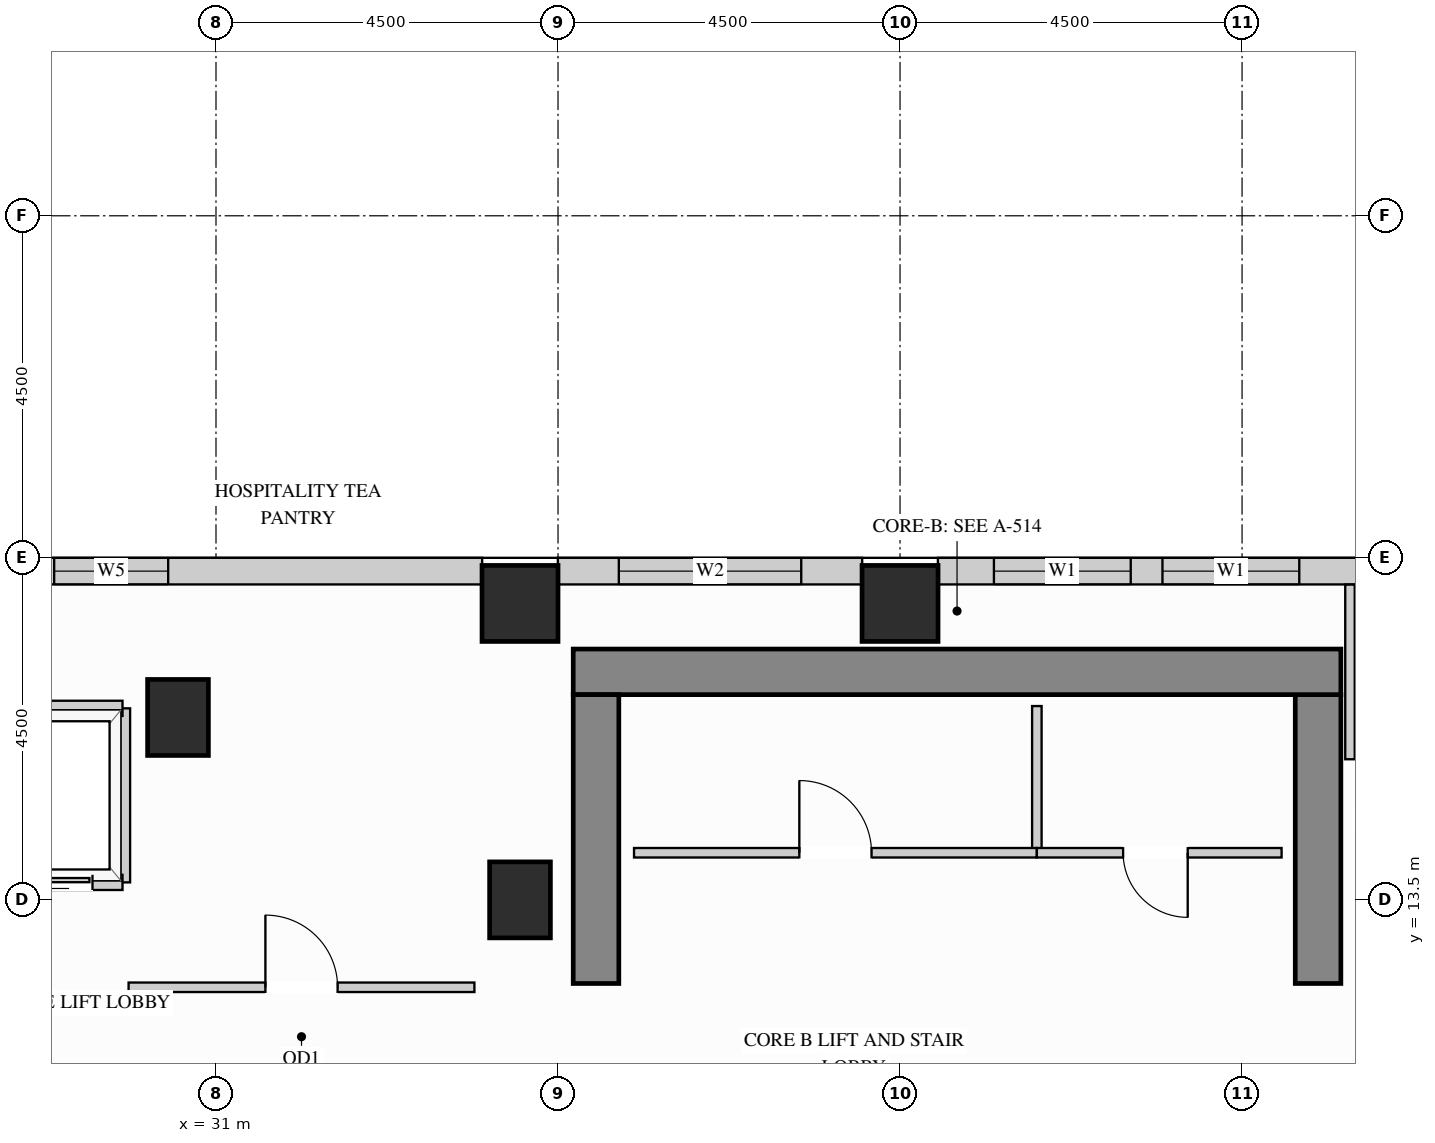
"""IFC4 building model, lengths in metres.
Left out: names, types, materials, properties, quantities, classifications, styles, units other than length and angle.
Written with IfcOpenShell. Run it as: python <this file> out.ifc"""

import sys

from ifc_helpers import new_model, si_unit, direction, frame, frame_2d, origin, origin_2d, place, context, subcontext, project, spatial, rectangle, extrude, source, transform, mapped, element, fill, save


model = new_model("IFC4")
c1 = context("Model", 3, precision=1e-05, world=origin(), true_north=direction((0.0, 1.0)))
c2 = subcontext(c1, "Body", "Model", "MODEL_VIEW")
j1 = project(units=[si_unit("LENGTHUNIT", "METRE"), si_unit("PLANEANGLEUNIT", "RADIAN")], contexts=[c1])
p1 = place(None, origin())
s1 = spatial("IfcSite", under=j1, at=p1, CompositionType="ELEMENT")
p2 = place(p1, origin())
s2 = spatial("IfcBuilding", under=s1, at=p2, CompositionType="ELEMENT")
p3 = place(p2, frame((0.0, 0.0, 164.7)))
s3 = spatial("IfcBuildingStorey", under=s2, at=p3, CompositionType="ELEMENT", Elevation=164.7)
m1 = source(origin(), c2, "Body", "SweptSolid", [
    extrude(rectangle(XDim=0.8, YDim=1.0, at=origin_2d()), origin(), (0.0, 0.0, 1.0), 3.4),
])
for number, where, z_axis, x_axis in (
    (1, (35.0, 13.5, 0.0), (0.0, 0.0, 1.0), (1.0, 0.0, 0.0)),
    (2, (30.5, 15.9, 0.0), (0.0, 0.0, 1.0), (1.0, 0.0, 0.0)),
):
    element("IfcColumn", number, at=place(p3, frame(where, z_axis=z_axis, x_axis=x_axis)), inside=s3, PredefinedType="COLUMN", context=c2, shape_type="MappedRepresentation", body=[
        mapped(m1, transform((0.0, 0.0, 0.0), x_axis=(1.0, 0.0, 0.0), y_axis=(0.0, 1.0, 0.0), z_axis=(0.0, 0.0, 1.0))),
    ])
m2 = source(origin(), c2, "Body", "SweptSolid", [
    extrude(rectangle(XDim=1.0, YDim=1.0, at=origin_2d()), origin(), (0.0, 0.0, 1.0), 3.4),
])
for number, where, z_axis, x_axis in (
    (3, (35.0, 17.4, 0.0), (0.0, 0.0, 1.0), (1.0, 0.0, 0.0)),
    (4, (40.0, 17.4, 0.0), (0.0, 0.0, 1.0), (1.0, 0.0, 0.0)),
):
    element("IfcColumn", number, at=place(p3, frame(where, z_axis=z_axis, x_axis=x_axis)), inside=s3, PredefinedType="COLUMN", context=c2, shape_type="MappedRepresentation", body=[
        mapped(m2, transform((0.0, 0.0, 0.0), x_axis=(1.0, 0.0, 0.0), y_axis=(0.0, 1.0, 0.0), z_axis=(0.0, 0.0, 1.0))),
    ])
m3 = source(origin(), c2, "Body", "SweptSolid", [
    extrude(rectangle(XDim=3.8, YDim=0.6, at=frame_2d((1.9, 0.0))), origin(), (0.0, 0.0, 1.0), 3.4),
])
p4 = place(p3, frame((45.5, 12.4, 0.0), z_axis=(0.0, 0.0, 1.0), x_axis=(0.0, 1.0, 0.0)))
e5 = element("IfcWall", 5, at=p4, inside=s3, PredefinedType="SHEAR", context=c2, shape_type="MappedRepresentation", body=[
    mapped(m3, transform((0.0, 0.0, 0.0), x_axis=(1.0, 0.0, 0.0), y_axis=(0.0, 1.0, 0.0), z_axis=(0.0, 0.0, 1.0))),
])
m4 = source(origin(), c2, "Body", "SweptSolid", [
    extrude(rectangle(XDim=10.1, YDim=0.6, at=frame_2d((5.05, 0.0))), origin(), (0.0, 0.0, 1.0), 3.4),
])
p5 = place(p3, frame((35.7, 16.5, 0.0), z_axis=(0.0, 0.0, 1.0), x_axis=(1.0, 0.0, 0.0)))
e6 = element("IfcWall", 6, at=p5, inside=s3, PredefinedType="SHEAR", context=c2, shape_type="MappedRepresentation", body=[
    mapped(m4, transform((0.0, 0.0, 0.0), x_axis=(1.0, 0.0, 0.0), y_axis=(0.0, 1.0, 0.0), z_axis=(0.0, 0.0, 1.0))),
])
p6 = place(p3, frame((36.0, 12.4, 0.0), z_axis=(0.0, 0.0, 1.0), x_axis=(0.0, 1.0, 0.0)))
e7 = element("IfcWall", 7, at=p6, inside=s3, PredefinedType="SHEAR", context=c2, shape_type="MappedRepresentation", body=[
    mapped(m3, transform((0.0, 0.0, 0.0), x_axis=(1.0, 0.0, 0.0), y_axis=(0.0, 1.0, 0.0), z_axis=(0.0, 0.0, 1.0))),
])
p7 = place(p3, frame((47.102, 17.825, 0.0), z_axis=(0.0, 0.0, 1.0), x_axis=(-1.0, 0.0, 0.0)))
e8 = element("IfcWall", 8, at=p7, inside=s3, PredefinedType="SOLIDWALL", context=c2, shape_type="SweptSolid", body=[
    extrude(rectangle(XDim=6.604, YDim=0.35, at=frame_2d((3.302, 0.0))), origin(), (0.0, 0.0, 1.0), 2.612),
])
p8 = place(p7, frame((1.849, 0.0, 0.78)))
e9 = element("IfcOpeningElement", 9, at=p8, cuts=e8, PredefinedType="OPENING", context=c2, shape_type="SweptSolid", body=[
    extrude(rectangle(XDim=1.8, YDim=1.652, at=frame_2d((0.9, 0.826))), frame((0.0, 0.185, 0.0), z_axis=(0.0, -1.0, 0.0), x_axis=(1.0, 0.0, 0.0)), (0.0, 0.0, 1.0), 0.37),
])
p9 = place(p7, frame((4.067, 0.0, 0.78)))
e10 = element("IfcOpeningElement", 10, at=p9, cuts=e8, PredefinedType="OPENING", context=c2, shape_type="SweptSolid", body=[
    extrude(rectangle(XDim=1.8, YDim=1.652, at=frame_2d((0.9, 0.826))), frame((0.0, 0.185, 0.0), z_axis=(0.0, -1.0, 0.0), x_axis=(1.0, 0.0, 0.0)), (0.0, 0.0, 1.0), 0.37),
])
p10 = place(p3, frame((39.502, 17.825, 0.0), z_axis=(0.0, 0.0, 1.0), x_axis=(-1.0, 0.0, 0.0)))
e11 = element("IfcWall", 11, at=p10, inside=s3, PredefinedType="SOLIDWALL", context=c2, shape_type="SweptSolid", body=[
    extrude(rectangle(XDim=4.004, YDim=0.35, at=frame_2d((2.002, 0.0))), origin(), (0.0, 0.0, 1.0), 2.612),
])
p11 = place(p10, frame((0.802, 0.0, 0.78)))
e12 = element("IfcOpeningElement", 12, at=p11, cuts=e11, PredefinedType="OPENING", context=c2, shape_type="SweptSolid", body=[
    extrude(rectangle(XDim=2.4, YDim=1.652, at=frame_2d((1.2, 0.826))), frame((0.0, 0.185, 0.0), z_axis=(0.0, -1.0, 0.0), x_axis=(1.0, 0.0, 0.0)), (0.0, 0.0, 1.0), 0.37),
])
p12 = place(p3, frame((34.502, 17.825, 0.0), z_axis=(0.0, 0.0, 1.0), x_axis=(-1.0, 0.0, 0.0)))
e13 = element("IfcWall", 13, at=p12, inside=s3, PredefinedType="SOLIDWALL", context=c2, shape_type="SweptSolid", body=[
    extrude(rectangle(XDim=15.104, YDim=0.35, at=frame_2d((7.552, 0.0))), origin(), (0.0, 0.0, 1.0), 3.385),
])
p13 = place(p12, frame((4.131, 0.0, 0.78)))
e14 = element("IfcOpeningElement", 14, at=p13, cuts=e13, PredefinedType="OPENING", context=c2, shape_type="SweptSolid", body=[
    extrude(rectangle(XDim=1.5, YDim=2.0, at=frame_2d((0.75, 1.0))), frame((0.0, 0.185, 0.0), z_axis=(0.0, -1.0, 0.0), x_axis=(1.0, 0.0, 0.0)), (0.0, 0.0, 1.0), 0.37),
])
p14 = place(p12, frame((9.442, 0.0, 0.78)))
e15 = element("IfcOpeningElement", 15, at=p14, cuts=e13, PredefinedType="OPENING", context=c2, shape_type="SweptSolid", body=[
    extrude(rectangle(XDim=1.5, YDim=2.0, at=frame_2d((0.75, 1.0))), frame((0.0, 0.185, 0.0), z_axis=(0.0, -1.0, 0.0), x_axis=(1.0, 0.0, 0.0)), (0.0, 0.0, 1.0), 0.37),
])
m5 = source(origin(), c2, "Body", "SweptSolid", [
    extrude(rectangle(XDim=1.93, YDim=0.125, at=frame_2d((0.965, 0.0))), origin(), (0.0, 0.0, 1.0), 3.385),
])
p15 = place(p3, frame((41.8, 14.12, 0.0), z_axis=(0.0, 0.0, 1.0), x_axis=(0.0, 1.0, 0.0)))
e16 = element("IfcWall", 16, at=p15, inside=s3, PredefinedType="PARTITIONING", context=c2, shape_type="MappedRepresentation", body=[
    mapped(m5, transform((0.0, 0.0, 0.0), x_axis=(1.0, 0.0, 0.0), y_axis=(0.0, 1.0, 0.0), z_axis=(0.0, 0.0, 1.0))),
])
p16 = place(p3, frame((36.5, 14.12, 0.0), z_axis=(0.0, 0.0, 1.0), x_axis=(1.0, 0.0, 0.0)))
e17 = element("IfcWall", 17, at=p16, inside=s3, PredefinedType="PARTITIONING", context=c2, shape_type="SweptSolid", body=[
    extrude(rectangle(XDim=5.3, YDim=0.125, at=frame_2d((2.65, 0.0))), origin(), (0.0, 0.0, 1.0), 3.385),
])
p17 = place(p16, frame((2.175, 0.0, 0.0)))
e18 = element("IfcOpeningElement", 18, at=p17, cuts=e17, PredefinedType="OPENING", context=c2, shape_type="SweptSolid", body=[
    extrude(rectangle(XDim=0.95, YDim=2.15, at=frame_2d((0.475, 1.075))), frame((0.0, 0.073, 0.0), z_axis=(0.0, -1.0, 0.0), x_axis=(1.0, 0.0, 0.0)), (0.0, 0.0, 1.0), 0.145),
])
p18 = place(p3, frame((41.8, 14.12, 0.0), z_axis=(0.0, 0.0, 1.0), x_axis=(1.0, 0.0, 0.0)))
e19 = element("IfcWall", 19, at=p18, inside=s3, PredefinedType="PARTITIONING", context=c2, shape_type="SweptSolid", body=[
    extrude(rectangle(XDim=3.22, YDim=0.125, at=frame_2d((1.61, 0.0))), origin(), (0.0, 0.0, 1.0), 3.385),
])
p19 = place(p18, frame((1.135, 0.0, 0.0)))
e20 = element("IfcOpeningElement", 20, at=p19, cuts=e19, PredefinedType="OPENING", context=c2, shape_type="SweptSolid", body=[
    extrude(rectangle(XDim=0.85, YDim=2.1, at=frame_2d((0.425, 1.05))), frame((0.0, 0.073, 0.0), z_axis=(0.0, -1.0, 0.0), x_axis=(1.0, 0.0, 0.0)), (0.0, 0.0, 1.0), 0.145),
])
m6 = source(origin(), c2, "Body", "SweptSolid", [
    extrude(rectangle(XDim=2.298, YDim=0.125, at=frame_2d((1.149, 0.0))), origin(), (0.0, 0.0, 1.0), 3.385),
])
p20 = place(p3, frame((45.92, 15.35, 0.0), z_axis=(0.0, 0.0, 1.0), x_axis=(0.0, 1.0, 0.0)))
e21 = element("IfcWall", 21, at=p20, inside=s3, PredefinedType="PARTITIONING", context=c2, shape_type="MappedRepresentation", body=[
    mapped(m6, transform((0.0, 0.0, 0.0), x_axis=(1.0, 0.0, 0.0), y_axis=(0.0, 1.0, 0.0), z_axis=(0.0, 0.0, 1.0))),
])
p21 = place(p3, frame((29.85, 12.35, 0.0), z_axis=(0.0, 0.0, 1.0), x_axis=(1.0, 0.0, 0.0)))
e22 = element("IfcWall", 22, at=p21, inside=s3, PredefinedType="PARTITIONING", context=c2, shape_type="SweptSolid", body=[
    extrude(rectangle(XDim=4.55, YDim=0.125, at=frame_2d((2.275, 0.0))), origin(), (0.0, 0.0, 1.0), 3.385),
])
p22 = place(p21, frame((1.8, 0.0, 0.0)))
e23 = element("IfcOpeningElement", 23, at=p22, cuts=e22, PredefinedType="OPENING", context=c2, shape_type="SweptSolid", body=[
    extrude(rectangle(XDim=0.95, YDim=2.15, at=frame_2d((0.475, 1.075))), frame((0.0, 0.073, 0.0), z_axis=(0.0, -1.0, 0.0), x_axis=(1.0, 0.0, 0.0)), (0.0, 0.0, 1.0), 0.145),
])
m7 = source(origin(), c2, "Body", "SweptSolid", [
    extrude(rectangle(XDim=2.29, YDim=0.2, at=frame_2d((1.145, 0.0))), origin(), (0.0, 0.0, 1.0), 3.385),
])
p23 = place(p3, frame((29.77, 13.73, 0.0), z_axis=(0.0, 0.0, 1.0), x_axis=(0.0, 1.0, 0.0)))
e24 = element("IfcWall", 24, at=p23, inside=s3, PredefinedType="PARTITIONING", context=c2, shape_type="MappedRepresentation", body=[
    mapped(m7, transform((0.0, 0.0, 0.0), x_axis=(1.0, 0.0, 0.0), y_axis=(0.0, 1.0, 0.0), z_axis=(0.0, 0.0, 1.0))),
])
m8 = source(origin(), c2, "Body", "SweptSolid", [
    extrude(rectangle(XDim=1.89, YDim=0.2, at=frame_2d((0.945, 0.0))), origin(), (0.0, 0.0, 1.0), 2.773),
])
p24 = place(p3, frame((27.88, 16.02, 0.0), z_axis=(0.0, 0.0, 1.0), x_axis=(1.0, 0.0, 0.0)))
e25 = element("IfcWall", 25, at=p24, inside=s3, PredefinedType="PARTITIONING", context=c2, shape_type="MappedRepresentation", body=[
    mapped(m8, transform((0.0, 0.0, 0.0), x_axis=(1.0, 0.0, 0.0), y_axis=(0.0, 1.0, 0.0), z_axis=(0.0, 0.0, 1.0))),
])
p25 = place(p3, frame((27.88, 13.73, 0.0), z_axis=(0.0, 0.0, 1.0), x_axis=(1.0, 0.0, 0.0)))
e26 = element("IfcWall", 26, at=p25, inside=s3, PredefinedType="PARTITIONING", context=c2, shape_type="SweptSolid", body=[
    extrude(rectangle(XDim=1.89, YDim=0.2, at=frame_2d((0.945, 0.0))), origin(), (0.0, 0.0, 1.0), 2.466),
])
p26 = place(p25, frame((0.395, 0.0, 0.0)))
e27 = element("IfcOpeningElement", 27, at=p26, cuts=e26, PredefinedType="OPENING", context=c2, shape_type="SweptSolid", body=[
    extrude(rectangle(XDim=1.1, YDim=2.2, at=frame_2d((0.55, 1.1))), frame((0.0, 0.11, 0.0), z_axis=(0.0, -1.0, 0.0), x_axis=(1.0, 0.0, 0.0)), (0.0, 0.0, 1.0), 0.22),
])
m9 = source(origin(), c2, "Body", "SweptSolid", [
    extrude(rectangle(XDim=1.1, YDim=2.2, at=frame_2d((0.55, 1.1))), frame((0.0, 0.025, 0.0), z_axis=(0.0, -1.0, 0.0), x_axis=(1.0, 0.0, 0.0)), (0.0, 0.0, 1.0), 0.05),
])
p27 = place(p26, origin())
e28 = element("IfcDoor", 28, at=p27, inside=s3, OperationType="SLIDING_TO_LEFT", PredefinedType="DOOR", context=c2, shape_type="MappedRepresentation", body=[
    mapped(m9, transform((0.0, 0.0, 0.0), x_axis=(1.0, 0.0, 0.0), y_axis=(0.0, 1.0, 0.0), z_axis=(0.0, 0.0, 1.0))),
])
fill(e27, e28)
m10 = source(origin(), c2, "Body", "SweptSolid", [
    extrude(rectangle(XDim=0.95, YDim=2.15, at=frame_2d((0.475, 1.075))), frame((0.0, 0.025, 0.0), z_axis=(0.0, -1.0, 0.0), x_axis=(1.0, 0.0, 0.0)), (0.0, 0.0, 1.0), 0.05),
])
p28 = place(p17, origin())
e29 = element("IfcDoor", 29, at=p28, inside=s3, OperationType="SINGLE_SWING_LEFT", PredefinedType="DOOR", context=c2, shape_type="MappedRepresentation", body=[
    mapped(m10, transform((0.0, 0.0, 0.0), x_axis=(1.0, 0.0, 0.0), y_axis=(0.0, 1.0, 0.0), z_axis=(0.0, 0.0, 1.0))),
])
fill(e18, e29)
p29 = place(p22, origin())
e30 = element("IfcDoor", 30, at=p29, inside=s3, OperationType="SINGLE_SWING_LEFT", PredefinedType="DOOR", context=c2, shape_type="MappedRepresentation", body=[
    mapped(m10, transform((0.0, 0.0, 0.0), x_axis=(1.0, 0.0, 0.0), y_axis=(0.0, 1.0, 0.0), z_axis=(0.0, 0.0, 1.0))),
])
fill(e23, e30)
m11 = source(origin(), c2, "Body", "SweptSolid", [
    extrude(rectangle(XDim=0.85, YDim=2.1, at=frame_2d((0.425, 1.05))), frame((0.0, 0.025, 0.0), z_axis=(0.0, -1.0, 0.0), x_axis=(1.0, 0.0, 0.0)), (0.0, 0.0, 1.0), 0.05),
])
p30 = place(p19, origin())
e31 = element("IfcDoor", 31, at=p30, inside=s3, OperationType="SINGLE_SWING_RIGHT", PredefinedType="DOOR", context=c2, shape_type="MappedRepresentation", body=[
    mapped(m11, transform((0.0, 0.0, 0.0), x_axis=(1.0, 0.0, 0.0), y_axis=(0.0, 1.0, 0.0), z_axis=(0.0, 0.0, 1.0))),
])
fill(e20, e31)
m12 = source(origin(), c2, "Body", "SweptSolid", [
    extrude(rectangle(XDim=1.8, YDim=1.652, at=frame_2d((0.9, 0.826))), frame((0.0, 0.03, 0.0), z_axis=(0.0, -1.0, 0.0), x_axis=(1.0, 0.0, 0.0)), (0.0, 0.0, 1.0), 0.06),
])
p31 = place(p8, origin())
e32 = element("IfcWindow", 32, at=p31, inside=s3, PartitioningType="SINGLE_PANEL", PredefinedType="WINDOW", context=c2, shape_type="MappedRepresentation", body=[
    mapped(m12, transform((0.0, 0.0, 0.0), x_axis=(1.0, 0.0, 0.0), y_axis=(0.0, 1.0, 0.0), z_axis=(0.0, 0.0, 1.0))),
])
fill(e9, e32)
p32 = place(p9, origin())
e33 = element("IfcWindow", 33, at=p32, inside=s3, PartitioningType="SINGLE_PANEL", PredefinedType="WINDOW", context=c2, shape_type="MappedRepresentation", body=[
    mapped(m12, transform((0.0, 0.0, 0.0), x_axis=(1.0, 0.0, 0.0), y_axis=(0.0, 1.0, 0.0), z_axis=(0.0, 0.0, 1.0))),
])
fill(e10, e33)
m13 = source(origin(), c2, "Body", "SweptSolid", [
    extrude(rectangle(XDim=2.4, YDim=1.652, at=frame_2d((1.2, 0.826))), frame((0.0, 0.03, 0.0), z_axis=(0.0, -1.0, 0.0), x_axis=(1.0, 0.0, 0.0)), (0.0, 0.0, 1.0), 0.06),
])
p33 = place(p11, origin())
e34 = element("IfcWindow", 34, at=p33, inside=s3, PartitioningType="SINGLE_PANEL", PredefinedType="WINDOW", context=c2, shape_type="MappedRepresentation", body=[
    mapped(m13, transform((0.0, 0.0, 0.0), x_axis=(1.0, 0.0, 0.0), y_axis=(0.0, 1.0, 0.0), z_axis=(0.0, 0.0, 1.0))),
])
fill(e12, e34)
m14 = source(origin(), c2, "Body", "SweptSolid", [
    extrude(rectangle(XDim=1.5, YDim=2.0, at=frame_2d((0.75, 1.0))), frame((0.0, 0.03, 0.0), z_axis=(0.0, -1.0, 0.0), x_axis=(1.0, 0.0, 0.0)), (0.0, 0.0, 1.0), 0.06),
])
p34 = place(p13, origin())
e35 = element("IfcWindow", 35, at=p34, inside=s3, PartitioningType="SINGLE_PANEL", PredefinedType="WINDOW", context=c2, shape_type="MappedRepresentation", body=[
    mapped(m14, transform((0.0, 0.0, 0.0), x_axis=(1.0, 0.0, 0.0), y_axis=(0.0, 1.0, 0.0), z_axis=(0.0, 0.0, 1.0))),
])
fill(e14, e35)
save(model, sys.argv[1])
